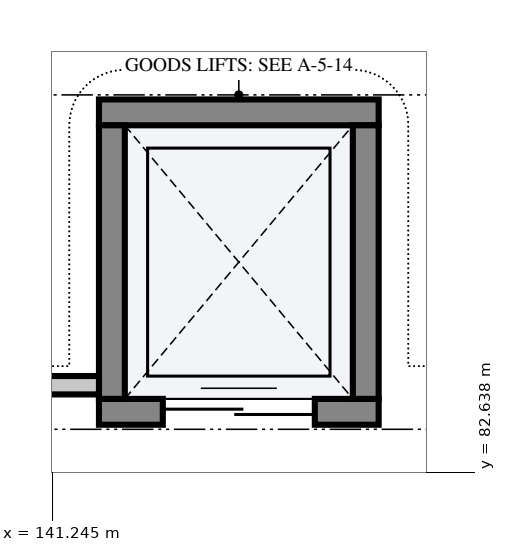
"""IFC4 building model, lengths in metres.
Left out: names, types, materials, properties, quantities, classifications, styles, units other than length and angle.
Written with IfcOpenShell. Run it as: python <this file> out.ifc"""

import sys

from ifc_helpers import new_model, si_unit, direction, frame, frame_2d, origin, place, context, subcontext, project, spatial, rectangle, extrude, element, fill, save


model = new_model("IFC4")
c1 = context("Model", 3, precision=1e-05, world=origin(), true_north=direction((0.0, 1.0)))
c2 = subcontext(c1, "Body", "Model", "MODEL_VIEW")
j1 = project(units=[si_unit("LENGTHUNIT", "METRE"), si_unit("PLANEANGLEUNIT", "RADIAN")], contexts=[c1])
p1 = place(None, origin())
s1 = spatial("IfcSite", under=j1, at=p1, CompositionType="ELEMENT")
p2 = place(p1, origin())
s2 = spatial("IfcBuilding", under=s1, at=p2, CompositionType="ELEMENT")
p3 = place(p2, frame((0.0, 0.0, -4.8)))
s3 = spatial("IfcBuildingStorey", under=s2, at=p3, CompositionType="ELEMENT", Elevation=-4.8)
p4 = place(p3, frame((141.86, 83.43, 0.0), z_axis=(0.0, 0.0, 1.0), x_axis=(1.0, 0.0, 0.0)))
e1 = element("IfcWall", 1, at=p4, inside=s3, PredefinedType="SHEAR", context=c2, shape_type="SweptSolid", body=[
    extrude(rectangle(XDim=3.68, YDim=0.34, at=frame_2d((1.84, 0.0))), origin(), (0.0, 0.0, 1.0), 4.5),
])
p5 = place(p4, frame((0.84, 0.0, 0.0)))
e2 = element("IfcOpeningElement", 2, at=p5, cuts=e1, PredefinedType="OPENING", context=c2, shape_type="SweptSolid", body=[
    extrude(rectangle(XDim=2.0, YDim=2.4, at=frame_2d((1.0, 1.2))), frame((0.0, 0.182, 0.0), z_axis=(0.0, -1.0, 0.0), x_axis=(1.0, 0.0, 0.0)), (0.0, 0.0, 1.0), 0.364),
])
p6 = place(p3, frame((141.86, 87.37, 0.0), z_axis=(0.0, 0.0, 1.0), x_axis=(1.0, 0.0, 0.0)))
e3 = element("IfcWall", 3, at=p6, inside=s3, PredefinedType="SHEAR", context=c2, shape_type="SweptSolid", body=[
    extrude(rectangle(XDim=3.68, YDim=0.34, at=frame_2d((1.84, 0.0))), origin(), (0.0, 0.0, 1.0), 4.5),
])
for number, where, z_axis, x_axis in (
    (4, (142.03, 83.6, 0.0), (0.0, 0.0, 1.0), (0.0, 1.0, 0.0)),
    (5, (145.37, 83.6, 0.0), (0.0, 0.0, 1.0), (0.0, 1.0, 0.0)),
):
    element("IfcWall", number, at=place(p3, frame(where, z_axis=z_axis, x_axis=x_axis)), inside=s3, PredefinedType="SHEAR", context=c2, shape_type="SweptSolid", body=[
        extrude(rectangle(XDim=3.6, YDim=0.34, at=frame_2d((1.8, 0.0))), origin(), (0.0, 0.0, 1.0), 4.5),
    ])
p7 = place(p3, frame((141.86, 83.78, 0.0), z_axis=(0.0, 0.0, 1.0), x_axis=(-1.0, 0.0, 0.0)))
e6 = element("IfcWall", 6, at=p7, inside=s3, PredefinedType="PARTITIONING", context=c2, shape_type="SweptSolid", body=[
    extrude(rectangle(XDim=5.32, YDim=0.242, at=frame_2d((2.66, 0.0))), origin(), (0.0, 0.0, 1.0), 3.44),
])
p8 = place(p5, origin())
e7 = element("IfcDoor", 7, at=p8, inside=s3, OperationType="DOUBLE_DOOR_SLIDING", PredefinedType="DOOR", context=c2, shape_type="SweptSolid", body=[
    extrude(rectangle(XDim=2.0, YDim=2.4, at=frame_2d((1.0, 1.2))), frame((0.0, 0.025, 0.0), z_axis=(0.0, -1.0, 0.0), x_axis=(1.0, 0.0, 0.0)), (0.0, 0.0, 1.0), 0.05),
])
fill(e2, e7)
save(model, sys.argv[1])
